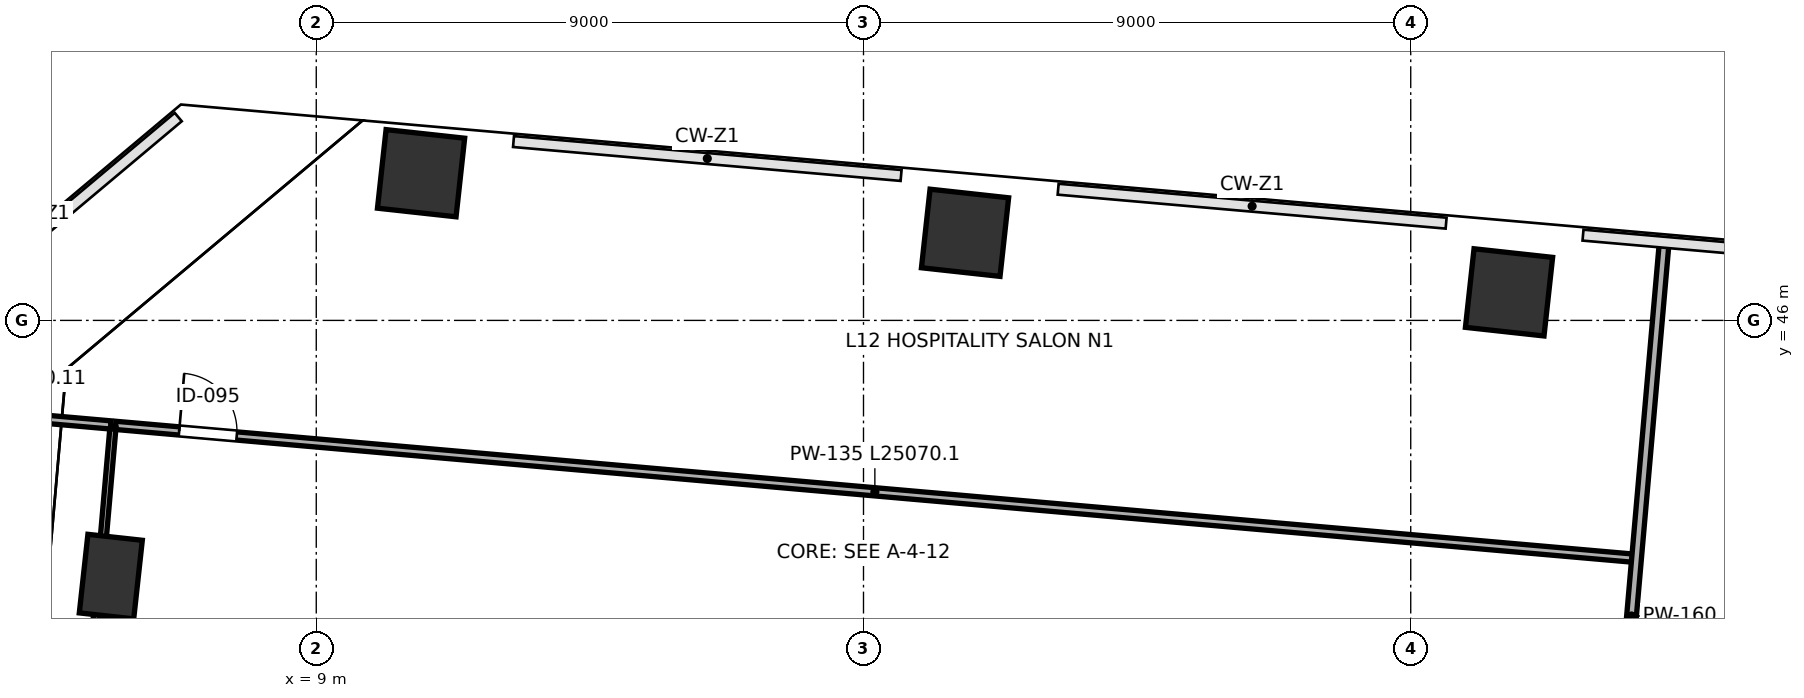
"""IFC4 building model, lengths in metres.
Left out: names, types, materials, properties, quantities, classifications, styles, units other than length and angle.
Written with IfcOpenShell. Run it as: python <this file> out.ifc"""

import sys

from ifc_helpers import new_model, si_unit, direction, frame, frame_2d, origin, origin_2d, place, context, subcontext, project, spatial, rectangle, extrude, clip, halfspace, source, transform, mapped, element, fill, save


model = new_model("IFC4")
c1 = context("Model", 3, precision=1e-05, world=origin(), true_north=direction((0.0, 1.0)))
c2 = subcontext(c1, "Body", "Model", "MODEL_VIEW")
j1 = project(units=[si_unit("LENGTHUNIT", "METRE"), si_unit("PLANEANGLEUNIT", "RADIAN")], contexts=[c1])
p1 = place(None, origin())
s1 = spatial("IfcSite", under=j1, at=p1, CompositionType="ELEMENT")
p2 = place(p1, origin())
s2 = spatial("IfcBuilding", under=s1, at=p2, CompositionType="ELEMENT")
p3 = place(p2, frame((0.0, 0.0, 56.8)))
s3 = spatial("IfcBuildingStorey", under=s2, at=p3, CompositionType="ELEMENT", Elevation=56.8)
p4 = place(p3, frame((10.724, 48.421, 0.0), z_axis=(0.074876369137, 0.047975589698, 0.996038087694), x_axis=(0.444981691761, -0.89548733486, 0.009681275911)))
e1 = element("IfcColumn", 1, at=p4, inside=s3, PredefinedType="COLUMN", context=c2, shape_type="Clipping", body=[
    clip(clip(extrude(rectangle(XDim=1.3, YDim=1.3, at=origin_2d()), origin(), (0.0, 0.0, 1.0), 4.819), halfspace(frame((0.0, 0.0, 0.065), z_axis=(0.0, 0.0, -1.0), x_axis=(1.0, 0.0, 0.0)), False)), halfspace(frame((0.0, 0.0, 4.754), z_axis=(0.0, 0.0, 1.0), x_axis=(1.0, 0.0, 0.0)), False)),
])
p5 = place(p3, frame((19.67, 47.441, 0.0), z_axis=(0.070065939865, 0.007559612628, 0.997513717363), x_axis=(-0.001336889488, -0.999969675123, 0.007672128883)))
e2 = element("IfcColumn", 2, at=p5, inside=s3, PredefinedType="COLUMN", context=c2, shape_type="Clipping", body=[
    clip(clip(extrude(rectangle(XDim=1.3, YDim=1.3, at=origin_2d()), origin(), (0.0, 0.0, 1.0), 4.812), halfspace(frame((0.0, 0.0, 0.052), z_axis=(0.0, 0.0, -1.0), x_axis=(1.0, 0.0, 0.0)), False)), halfspace(frame((0.0, 0.0, 4.76), z_axis=(0.0, 0.0, 1.0), x_axis=(1.0, 0.0, 0.0)), False)),
])
p6 = place(p3, frame((28.617, 46.461, 0.0), z_axis=(0.06518320686, -0.032972050163, 0.997328428077), x_axis=(-0.545578568093, -0.838021947032, 0.007952504676)))
e3 = element("IfcColumn", 3, at=p6, inside=s3, PredefinedType="COLUMN", context=c2, shape_type="Clipping", body=[
    clip(clip(extrude(rectangle(XDim=1.3, YDim=1.3, at=origin_2d()), origin(), (0.0, 0.0, 1.0), 4.813), halfspace(frame((0.0, 0.0, 0.053), z_axis=(0.0, 0.0, -1.0), x_axis=(1.0, 0.0, 0.0)), False)), halfspace(frame((0.0, 0.0, 4.76), z_axis=(0.0, 0.0, 1.0), x_axis=(1.0, 0.0, 0.0)), False)),
])
p7 = place(p3, frame((5.621, 41.787, 0.0), z_axis=(0.04510552975, 0.071408642042, 0.996426764508), x_axis=(0.782503935317, -0.622577740199, 0.009195032476)))
e4 = element("IfcColumn", 4, at=p7, inside=s3, PredefinedType="PILASTER", context=c2, shape_type="Clipping", body=[
    clip(clip(extrude(rectangle(XDim=0.9, YDim=1.3, at=origin_2d()), origin(), (0.0, 0.0, 1.0), 4.817), halfspace(frame((0.0, 0.0, 0.06), z_axis=(0.0, 0.0, -1.0), x_axis=(1.0, 0.0, 0.0)), False)), halfspace(frame((0.0, 0.0, 4.758), z_axis=(0.0, 0.0, 1.0), x_axis=(1.0, 0.0, 0.0)), False)),
])
p8 = place(p3, frame((5.7, 44.274, 0.0), z_axis=(0.0, 0.0, 1.0), x_axis=(0.996195324028, -0.087148587968, 0.0)))
e5 = element("IfcWall", 5, at=p8, inside=s3, PredefinedType="PARTITIONING", context=c2, shape_type="SweptSolid", body=[
    extrude(rectangle(XDim=25.07, YDim=0.135, at=frame_2d((12.535, 0.0))), origin(), (0.0, 0.0, 1.0), 4.56),
])
p9 = place(p8, frame((1.05, 0.0, 0.0)))
e6 = element("IfcOpeningElement", 6, at=p9, cuts=e5, PredefinedType="OPENING", context=c2, shape_type="SweptSolid", body=[
    extrude(rectangle(XDim=0.95, YDim=2.15, at=frame_2d((0.475, 1.075))), frame((0.0, 0.078, 0.0), z_axis=(0.0, -1.0, 0.0), x_axis=(1.0, 0.0, 0.0)), (0.0, 0.0, 1.0), 0.155),
])
p10 = place(p3, frame((3.61, 20.847, 0.0), z_axis=(0.0, 0.0, 1.0), x_axis=(0.087153664928, 0.996194879875, 0.0)))
e7 = element("IfcWall", 7, at=p10, inside=s3, PredefinedType="PARTITIONING", context=c2, shape_type="SweptSolid", body=[
    extrude(rectangle(XDim=23.48, YDim=0.1, at=frame_2d((11.74, 0.0))), origin(), (0.0, 0.0, 1.0), 3.695),
])
p11 = place(p10, frame((1.8, 0.0, 0.0)))
e8 = element("IfcOpeningElement", 8, at=p11, cuts=e7, PredefinedType="OPENING", context=c2, shape_type="SweptSolid", body=[
    extrude(rectangle(XDim=0.95, YDim=2.15, at=frame_2d((0.475, 1.075))), frame((0.0, 0.06, 0.0), z_axis=(0.0, -1.0, 0.0), x_axis=(1.0, 0.0, 0.0)), (0.0, 0.0, 1.0), 0.12),
])
p12 = place(p3, frame((2.004, 44.597, 0.0), z_axis=(0.0, 0.0, 1.0), x_axis=(0.996194520424, -0.087157773474, 0.0)))
e9 = element("IfcWall", 9, at=p12, inside=s3, PredefinedType="PARTITIONING", context=c2, shape_type="SweptSolid", body=[
    extrude(rectangle(XDim=3.63, YDim=0.135, at=frame_2d((1.815, 0.0))), origin(), (0.0, 0.0, 1.0), 4.56),
])
p13 = place(p3, frame((30.098, 35.042, 0.0), z_axis=(0.0, 0.0, 1.0), x_axis=(0.087145176091, 0.996195622498, 0.0)))
e10 = element("IfcWall", 10, at=p13, inside=s3, PredefinedType="PARTITIONING", context=c2, shape_type="SweptSolid", body=[
    extrude(rectangle(XDim=12.24, YDim=0.16, at=frame_2d((6.12, 0.0))), origin(), (0.0, 0.0, 1.0), 3.695),
])
m1 = source(origin(), c2, "Body", "SweptSolid", [
    extrude(rectangle(XDim=0.95, YDim=2.15, at=frame_2d((0.475, 1.075))), frame((0.0, 0.025, 0.0), z_axis=(0.0, -1.0, 0.0), x_axis=(1.0, 0.0, 0.0)), (0.0, 0.0, 1.0), 0.05),
])
p14 = place(p9, origin())
e11 = element("IfcDoor", 11, at=p14, inside=s3, OperationType="SINGLE_SWING_LEFT", PredefinedType="DOOR", context=c2, shape_type="MappedRepresentation", body=[
    mapped(m1, transform((0.0, 0.0, 0.0), scale=1.0)),
])
fill(e6, e11)
save(model, sys.argv[1])
